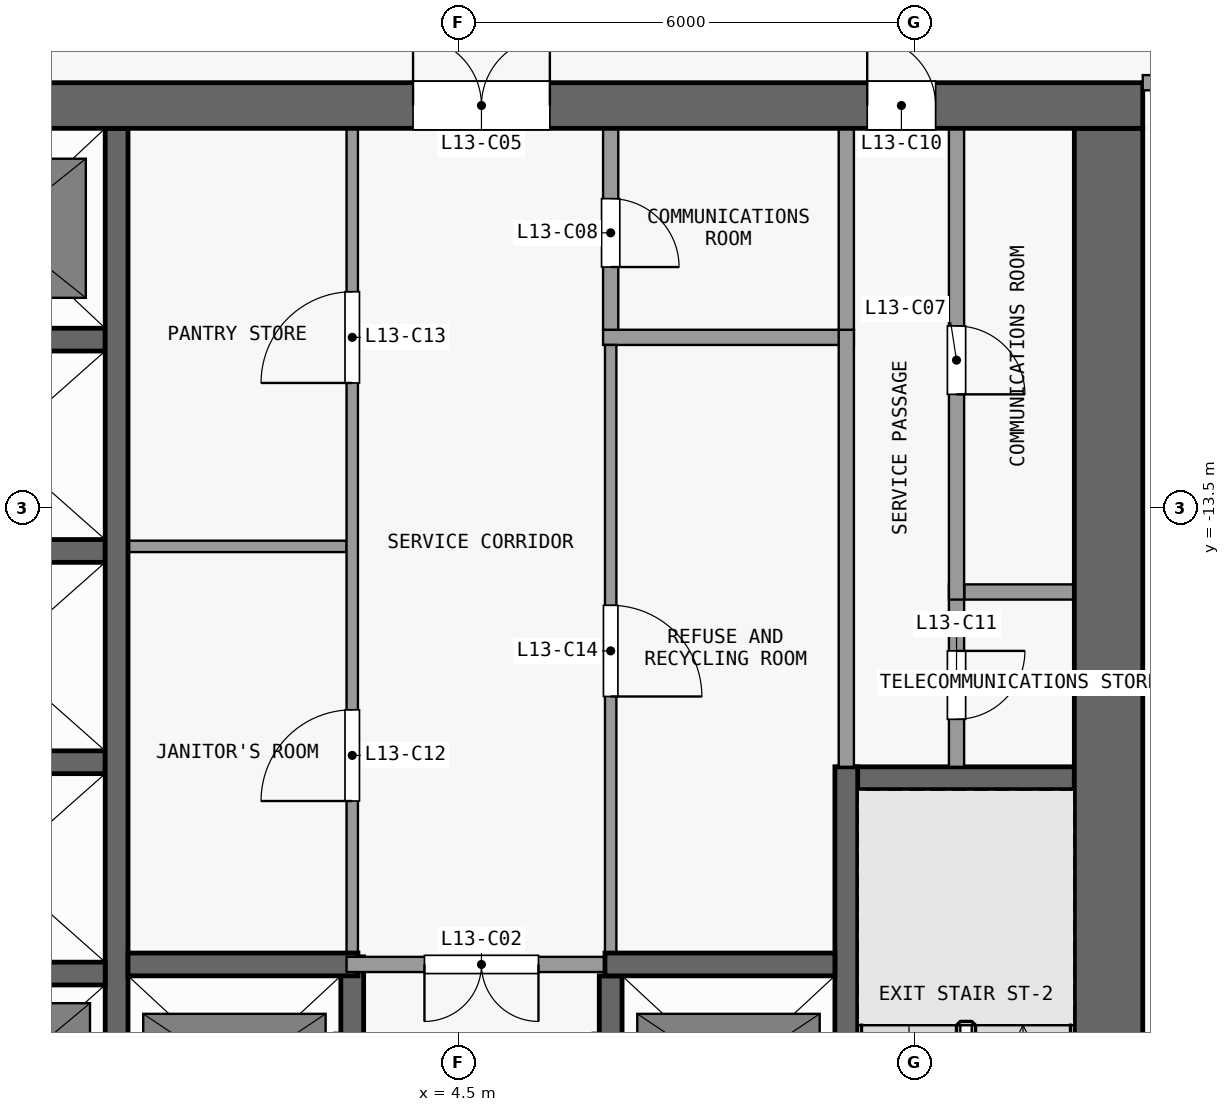
"""IFC4 building model, lengths in metres.
Left out: names, types, materials, properties, quantities, classifications, styles, units other than length and angle.
Written with IfcOpenShell. Run it as: python <this file> out.ifc"""

import sys

from ifc_helpers import new_model, si_unit, direction, frame, frame_2d, origin, place, context, subcontext, project, spatial, rectangle, extrude, element, fill, save


model = new_model("IFC4")
c1 = context("Model", 3, precision=1e-05, world=origin(), true_north=direction((0.0, 1.0)))
c2 = subcontext(c1, "Body", "Model", "MODEL_VIEW")
j1 = project(units=[si_unit("LENGTHUNIT", "METRE"), si_unit("PLANEANGLEUNIT", "RADIAN")], contexts=[c1])
p1 = place(None, origin())
s1 = spatial("IfcSite", under=j1, at=p1, CompositionType="ELEMENT")
p2 = place(p1, origin())
s2 = spatial("IfcBuilding", under=s1, at=p2, CompositionType="ELEMENT")
p3 = place(p2, frame((0.0, 0.0, 57.7)))
s3 = spatial("IfcBuildingStorey", under=s2, at=p3, CompositionType="ELEMENT", Elevation=57.7)
p4 = place(p3, frame((-13.5, -8.2, 0.0), z_axis=(0.0, 0.0, 1.0), x_axis=(1.0, 0.0, 0.0)))
e1 = element("IfcWall", 1, at=p4, inside=s3, PredefinedType="SHEAR", context=c2, shape_type="SweptSolid", body=[
    extrude(rectangle(XDim=27.0, YDim=0.6, at=frame_2d((13.5, 0.0))), origin(), (0.0, 0.0, 1.0), 3.3),
])
p5 = place(p4, frame((7.8, 0.0, 0.0)))
e2 = element("IfcOpeningElement", 2, at=p5, cuts=e1, PredefinedType="OPENING", context=c2, shape_type="SweptSolid", body=[
    extrude(rectangle(XDim=1.8, YDim=2.1, at=frame_2d((0.9, 1.05))), frame((0.0, 0.31, 0.0), z_axis=(0.0, -1.0, 0.0), x_axis=(1.0, 0.0, 0.0)), (0.0, 0.0, 1.0), 0.62),
])
p6 = place(p4, frame((17.4, 0.0, 0.0)))
e3 = element("IfcOpeningElement", 3, at=p6, cuts=e1, PredefinedType="OPENING", context=c2, shape_type="SweptSolid", body=[
    extrude(rectangle(XDim=1.8, YDim=2.1, at=frame_2d((0.9, 1.05))), frame((0.0, 0.31, 0.0), z_axis=(0.0, -1.0, 0.0), x_axis=(1.0, 0.0, 0.0)), (0.0, 0.0, 1.0), 0.62),
])
p7 = place(p4, frame((1.725, 0.0, 0.0)))
e4 = element("IfcOpeningElement", 4, at=p7, cuts=e1, PredefinedType="OPENING", context=c2, shape_type="SweptSolid", body=[
    extrude(rectangle(XDim=1.2, YDim=2.1, at=frame_2d((0.6, 1.05))), frame((0.0, 0.31, 0.0), z_axis=(0.0, -1.0, 0.0), x_axis=(1.0, 0.0, 0.0)), (0.0, 0.0, 1.0), 0.62),
])
p8 = place(p4, frame((23.375, 0.0, 0.0)))
e5 = element("IfcOpeningElement", 5, at=p8, cuts=e1, PredefinedType="OPENING", context=c2, shape_type="SweptSolid", body=[
    extrude(rectangle(XDim=0.9, YDim=2.1, at=frame_2d((0.45, 1.05))), frame((0.0, 0.31, 0.0), z_axis=(0.0, -1.0, 0.0), x_axis=(1.0, 0.0, 0.0)), (0.0, 0.0, 1.0), 0.62),
])
p9 = place(p3, frame((13.05, -24.6, 0.0), z_axis=(0.0, 0.0, 1.0), x_axis=(0.0, 1.0, 0.0)))
e6 = element("IfcWall", 6, at=p9, inside=s3, PredefinedType="SHEAR", context=c2, shape_type="SweptSolid", body=[
    extrude(rectangle(XDim=16.1, YDim=0.9, at=frame_2d((8.05, 0.0))), origin(), (0.0, 0.0, 1.0), 3.3),
])
p10 = place(p3, frame((-2.95, -19.62, 0.0), z_axis=(0.0, 0.0, 1.0), x_axis=(1.0, 0.0, 0.0)))
e7 = element("IfcWall", 7, at=p10, inside=s3, PredefinedType="SHEAR", context=c2, shape_type="SweptSolid", body=[
    extrude(rectangle(XDim=2.8, YDim=0.3, at=frame_2d((1.4, 0.0))), origin(), (0.0, 0.0, 1.0), 3.3),
])
p11 = place(p3, frame((0.15, -19.5, 0.0), z_axis=(0.0, 0.0, 1.0), x_axis=(1.0, 0.0, 0.0)))
e8 = element("IfcWall", 8, at=p11, inside=s3, PredefinedType="SHEAR", context=c2, shape_type="SweptSolid", body=[
    extrude(rectangle(XDim=3.025, YDim=0.3, at=frame_2d((1.513, 0.0))), origin(), (0.0, 0.0, 1.0), 3.3),
])
p12 = place(p3, frame((6.575, -19.5, 0.0), z_axis=(0.0, 0.0, 1.0), x_axis=(-1.0, 0.0, 0.0)))
e9 = element("IfcWall", 9, at=p12, inside=s3, PredefinedType="PARTITIONING", context=c2, shape_type="SweptSolid", body=[
    extrude(rectangle(XDim=3.55, YDim=0.2, at=frame_2d((1.775, 0.0))), origin(), (0.0, 0.0, 1.0), 3.3),
])
p13 = place(p12, frame((1.025, 0.0, 0.0)))
e10 = element("IfcOpeningElement", 10, at=p13, cuts=e9, PredefinedType="OPENING", context=c2, shape_type="SweptSolid", body=[
    extrude(rectangle(XDim=1.5, YDim=2.1, at=frame_2d((0.75, 1.05))), frame((0.0, 0.11, 0.0), z_axis=(0.0, -1.0, 0.0), x_axis=(1.0, 0.0, 0.0)), (0.0, 0.0, 1.0), 0.22),
])
p14 = place(p3, frame((6.425, -19.5, 0.0), z_axis=(0.0, 0.0, 1.0), x_axis=(1.0, 0.0, 0.0)))
e11 = element("IfcWall", 11, at=p14, inside=s3, PredefinedType="SHEAR", context=c2, shape_type="SweptSolid", body=[
    extrude(rectangle(XDim=3.025, YDim=0.3, at=frame_2d((1.512, 0.0))), origin(), (0.0, 0.0, 1.0), 3.3),
])
p15 = place(p3, frame((9.5, -17.05, 0.0), z_axis=(0.0, 0.0, 1.0), x_axis=(1.0, 0.0, 0.0)))
e12 = element("IfcWall", 12, at=p15, inside=s3, PredefinedType="SHEAR", context=c2, shape_type="SweptSolid", body=[
    extrude(rectangle(XDim=3.1, YDim=0.3, at=frame_2d((1.55, 0.0))), origin(), (0.0, 0.0, 1.0), 3.3),
])
p16 = place(p3, frame((-2.95, -16.84, 0.0), z_axis=(0.0, 0.0, 1.0), x_axis=(1.0, 0.0, 0.0)))
e13 = element("IfcWall", 13, at=p16, inside=s3, PredefinedType="SHEAR", context=c2, shape_type="SweptSolid", body=[
    extrude(rectangle(XDim=2.8, YDim=0.3, at=frame_2d((1.4, 0.0))), origin(), (0.0, 0.0, 1.0), 3.3),
])
p17 = place(p3, frame((11.15, -14.6, 0.0), z_axis=(0.0, 0.0, 1.0), x_axis=(1.0, 0.0, 0.0)))
e14 = element("IfcWall", 14, at=p17, inside=s3, PredefinedType="PARTITIONING", context=c2, shape_type="SweptSolid", body=[
    extrude(rectangle(XDim=1.45, YDim=0.2, at=frame_2d((0.725, 0.0))), origin(), (0.0, 0.0, 1.0), 3.3),
])
p18 = place(p3, frame((-2.95, -14.06, 0.0), z_axis=(0.0, 0.0, 1.0), x_axis=(1.0, 0.0, 0.0)))
e15 = element("IfcWall", 15, at=p18, inside=s3, PredefinedType="SHEAR", context=c2, shape_type="SweptSolid", body=[
    extrude(rectangle(XDim=2.8, YDim=0.3, at=frame_2d((1.4, 0.0))), origin(), (0.0, 0.0, 1.0), 3.3),
])
p19 = place(p3, frame((0.15, -14.0, 0.0), z_axis=(0.0, 0.0, 1.0), x_axis=(1.0, 0.0, 0.0)))
e16 = element("IfcWall", 16, at=p19, inside=s3, PredefinedType="PARTITIONING", context=c2, shape_type="SweptSolid", body=[
    extrude(rectangle(XDim=2.875, YDim=0.15, at=frame_2d((1.438, 0.0))), origin(), (0.0, 0.0, 1.0), 3.3),
])
p20 = place(p3, frame((-2.95, -11.28, 0.0), z_axis=(0.0, 0.0, 1.0), x_axis=(1.0, 0.0, 0.0)))
e17 = element("IfcWall", 17, at=p20, inside=s3, PredefinedType="SHEAR", context=c2, shape_type="SweptSolid", body=[
    extrude(rectangle(XDim=2.8, YDim=0.3, at=frame_2d((1.4, 0.0))), origin(), (0.0, 0.0, 1.0), 3.3),
])
p21 = place(p3, frame((6.4, -11.25, 0.0), z_axis=(0.0, 0.0, 1.0), x_axis=(1.0, 0.0, 0.0)))
e18 = element("IfcWall", 18, at=p21, inside=s3, PredefinedType="PARTITIONING", context=c2, shape_type="SweptSolid", body=[
    extrude(rectangle(XDim=3.3, YDim=0.2, at=frame_2d((1.65, 0.0))), origin(), (0.0, 0.0, 1.0), 3.3),
])
p22 = place(p3, frame((0.0, -22.25, 0.0), z_axis=(0.0, 0.0, 1.0), x_axis=(0.0, 1.0, 0.0)))
e19 = element("IfcWall", 19, at=p22, inside=s3, PredefinedType="SHEAR", context=c2, shape_type="SweptSolid", body=[
    extrude(rectangle(XDim=13.75, YDim=0.3, at=frame_2d((6.875, 0.0))), origin(), (0.0, 0.0, 1.0), 3.3),
])
p23 = place(p3, frame((3.1, -22.25, 0.0), z_axis=(0.0, 0.0, 1.0), x_axis=(0.0, 1.0, 0.0)))
e20 = element("IfcWall", 20, at=p23, inside=s3, PredefinedType="SHEAR", context=c2, shape_type="SweptSolid", body=[
    extrude(rectangle(XDim=2.85, YDim=0.3, at=frame_2d((1.425, 0.0))), origin(), (0.0, 0.0, 1.0), 3.3),
])
p24 = place(p23, frame((0.75, 0.0, 0.0)))
e21 = element("IfcOpeningElement", 21, at=p24, cuts=e20, PredefinedType="OPENING", context=c2, shape_type="SweptSolid", body=[
    extrude(rectangle(XDim=1.1, YDim=2.1, at=frame_2d((0.55, 1.05))), frame((0.0, 0.16, 0.0), z_axis=(0.0, -1.0, 0.0), x_axis=(1.0, 0.0, 0.0)), (0.0, 0.0, 1.0), 0.32),
])
p25 = place(p3, frame((3.1, -19.4, 0.0), z_axis=(0.0, 0.0, 1.0), x_axis=(0.0, 1.0, 0.0)))
e22 = element("IfcWall", 22, at=p25, inside=s3, PredefinedType="PARTITIONING", context=c2, shape_type="SweptSolid", body=[
    extrude(rectangle(XDim=10.9, YDim=0.15, at=frame_2d((5.45, 0.0))), origin(), (0.0, 0.0, 1.0), 3.3),
])
p26 = place(p25, frame((2.05, 0.0, 0.0)))
e23 = element("IfcOpeningElement", 23, at=p26, cuts=e22, PredefinedType="OPENING", context=c2, shape_type="SweptSolid", body=[
    extrude(rectangle(XDim=1.2, YDim=2.1, at=frame_2d((0.6, 1.05))), frame((0.0, 0.085, 0.0), z_axis=(0.0, -1.0, 0.0), x_axis=(1.0, 0.0, 0.0)), (0.0, 0.0, 1.0), 0.17),
])
p27 = place(p25, frame((7.55, 0.0, 0.0)))
e24 = element("IfcOpeningElement", 24, at=p27, cuts=e22, PredefinedType="OPENING", context=c2, shape_type="SweptSolid", body=[
    extrude(rectangle(XDim=1.2, YDim=2.1, at=frame_2d((0.6, 1.05))), frame((0.0, 0.085, 0.0), z_axis=(0.0, -1.0, 0.0), x_axis=(1.0, 0.0, 0.0)), (0.0, 0.0, 1.0), 0.17),
])
p28 = place(p3, frame((6.5, -22.25, 0.0), z_axis=(0.0, 0.0, 1.0), x_axis=(0.0, 1.0, 0.0)))
e25 = element("IfcWall", 25, at=p28, inside=s3, PredefinedType="SHEAR", context=c2, shape_type="SweptSolid", body=[
    extrude(rectangle(XDim=2.6, YDim=0.3, at=frame_2d((1.3, 0.0))), origin(), (0.0, 0.0, 1.0), 3.3),
])
p29 = place(p28, frame((0.75, 0.0, 0.0)))
e26 = element("IfcOpeningElement", 26, at=p29, cuts=e25, PredefinedType="OPENING", context=c2, shape_type="SweptSolid", body=[
    extrude(rectangle(XDim=1.1, YDim=2.1, at=frame_2d((0.55, 1.05))), frame((0.0, 0.16, 0.0), z_axis=(0.0, -1.0, 0.0), x_axis=(1.0, 0.0, 0.0)), (0.0, 0.0, 1.0), 0.32),
])
p30 = place(p3, frame((6.5, -11.35, 0.0), z_axis=(0.0, 0.0, 1.0), x_axis=(0.0, -1.0, 0.0)))
e27 = element("IfcWall", 27, at=p30, inside=s3, PredefinedType="PARTITIONING", context=c2, shape_type="SweptSolid", body=[
    extrude(rectangle(XDim=8.0, YDim=0.15, at=frame_2d((4.0, 0.0))), origin(), (0.0, 0.0, 1.0), 3.3),
])
p31 = place(p30, frame((3.425, 0.0, 0.0)))
e28 = element("IfcOpeningElement", 28, at=p31, cuts=e27, PredefinedType="OPENING", context=c2, shape_type="SweptSolid", body=[
    extrude(rectangle(XDim=1.2, YDim=2.1, at=frame_2d((0.6, 1.05))), frame((0.0, 0.085, 0.0), z_axis=(0.0, -1.0, 0.0), x_axis=(1.0, 0.0, 0.0)), (0.0, 0.0, 1.0), 0.17),
])
p32 = place(p3, frame((6.5, -8.5, 0.0), z_axis=(0.0, 0.0, 1.0), x_axis=(0.0, -1.0, 0.0)))
e29 = element("IfcWall", 29, at=p32, inside=s3, PredefinedType="PARTITIONING", context=c2, shape_type="SweptSolid", body=[
    extrude(rectangle(XDim=2.65, YDim=0.2, at=frame_2d((1.325, 0.0))), origin(), (0.0, 0.0, 1.0), 3.3),
])
p33 = place(p32, frame((0.925, 0.0, 0.0)))
e30 = element("IfcOpeningElement", 30, at=p33, cuts=e29, PredefinedType="OPENING", context=c2, shape_type="SweptSolid", body=[
    extrude(rectangle(XDim=0.9, YDim=2.1, at=frame_2d((0.45, 1.05))), frame((0.0, 0.11, 0.0), z_axis=(0.0, -1.0, 0.0), x_axis=(1.0, 0.0, 0.0)), (0.0, 0.0, 1.0), 0.22),
])
p34 = place(p3, frame((9.6, -16.9, 0.0), z_axis=(0.0, 0.0, 1.0), x_axis=(0.0, -1.0, 0.0)))
e31 = element("IfcWall", 31, at=p34, inside=s3, PredefinedType="SHEAR", context=c2, shape_type="SweptSolid", body=[
    extrude(rectangle(XDim=7.7, YDim=0.3, at=frame_2d((3.85, 0.0))), origin(), (0.0, 0.0, 1.0), 3.3),
])
p35 = place(p34, frame((6.5, 0.0, 0.0)))
e32 = element("IfcOpeningElement", 32, at=p35, cuts=e31, PredefinedType="OPENING", context=c2, shape_type="SweptSolid", body=[
    extrude(rectangle(XDim=1.1, YDim=2.1, at=frame_2d((0.55, 1.05))), frame((0.0, 0.16, 0.0), z_axis=(0.0, -1.0, 0.0), x_axis=(1.0, 0.0, 0.0)), (0.0, 0.0, 1.0), 0.32),
])
p36 = place(p3, frame((9.6, -16.9, 0.0), z_axis=(0.0, 0.0, 1.0), x_axis=(0.0, 1.0, 0.0)))
e33 = element("IfcWall", 33, at=p36, inside=s3, PredefinedType="PARTITIONING", context=c2, shape_type="SweptSolid", body=[
    extrude(rectangle(XDim=5.75, YDim=0.2, at=frame_2d((2.875, 0.0))), origin(), (0.0, 0.0, 1.0), 3.3),
])
p37 = place(p3, frame((9.6, -11.15, 0.0), z_axis=(0.0, 0.0, 1.0), x_axis=(0.0, 1.0, 0.0)))
e34 = element("IfcWall", 34, at=p37, inside=s3, PredefinedType="PARTITIONING", context=c2, shape_type="SweptSolid", body=[
    extrude(rectangle(XDim=2.65, YDim=0.2, at=frame_2d((1.325, 0.0))), origin(), (0.0, 0.0, 1.0), 3.3),
])
p38 = place(p3, frame((11.05, -14.5, 0.0), z_axis=(0.0, 0.0, 1.0), x_axis=(0.0, -1.0, 0.0)))
e35 = element("IfcWall", 35, at=p38, inside=s3, PredefinedType="PARTITIONING", context=c2, shape_type="SweptSolid", body=[
    extrude(rectangle(XDim=2.4, YDim=0.2, at=frame_2d((1.2, 0.0))), origin(), (0.0, 0.0, 1.0), 3.3),
])
p39 = place(p38, frame((0.875, 0.0, 0.0)))
e36 = element("IfcOpeningElement", 36, at=p39, cuts=e35, PredefinedType="OPENING", context=c2, shape_type="SweptSolid", body=[
    extrude(rectangle(XDim=0.9, YDim=2.1, at=frame_2d((0.45, 1.05))), frame((0.0, 0.11, 0.0), z_axis=(0.0, -1.0, 0.0), x_axis=(1.0, 0.0, 0.0)), (0.0, 0.0, 1.0), 0.22),
])
p40 = place(p3, frame((11.05, -8.5, 0.0), z_axis=(0.0, 0.0, 1.0), x_axis=(0.0, -1.0, 0.0)))
e37 = element("IfcWall", 37, at=p40, inside=s3, PredefinedType="PARTITIONING", context=c2, shape_type="SweptSolid", body=[
    extrude(rectangle(XDim=6.2, YDim=0.2, at=frame_2d((3.1, 0.0))), origin(), (0.0, 0.0, 1.0), 3.3),
])
p41 = place(p40, frame((2.6, 0.0, 0.0)))
e38 = element("IfcOpeningElement", 38, at=p41, cuts=e37, PredefinedType="OPENING", context=c2, shape_type="SweptSolid", body=[
    extrude(rectangle(XDim=0.9, YDim=2.1, at=frame_2d((0.45, 1.05))), frame((0.0, 0.11, 0.0), z_axis=(0.0, -1.0, 0.0), x_axis=(1.0, 0.0, 0.0)), (0.0, 0.0, 1.0), 0.22),
])
p42 = place(p3, frame((13.5, -7.9, 0.0), z_axis=(0.0, 0.0, 1.0), x_axis=(1.0, 0.0, 0.0)))
e39 = element("IfcWall", 39, at=p42, inside=s3, PredefinedType="PARTITIONING", context=c2, shape_type="SweptSolid", body=[
    extrude(rectangle(XDim=11.75, YDim=0.2, at=frame_2d((5.875, 0.0))), origin(), (0.0, 0.0, 1.0), 3.3),
])
p43 = place(p42, frame((1.0, 0.0, 0.0)))
e40 = element("IfcOpeningElement", 40, at=p43, cuts=e39, PredefinedType="OPENING", context=c2, shape_type="SweptSolid", body=[
    extrude(rectangle(XDim=1.0, YDim=2.1, at=frame_2d((0.5, 1.05))), frame((0.0, 0.11, 0.0), z_axis=(0.0, -1.0, 0.0), x_axis=(1.0, 0.0, 0.0)), (0.0, 0.0, 1.0), 0.22),
])
p44 = place(p13, origin())
e41 = element("IfcDoor", 41, at=p44, inside=s3, OperationType="DOUBLE_DOOR_SINGLE_SWING", PredefinedType="DOOR", context=c2, shape_type="SweptSolid", body=[
    extrude(rectangle(XDim=1.5, YDim=2.1, at=frame_2d((0.75, 1.05))), frame((0.0, 0.025, 0.0), z_axis=(0.0, -1.0, 0.0), x_axis=(1.0, 0.0, 0.0)), (0.0, 0.0, 1.0), 0.05),
])
fill(e10, e41)
p45 = place(p6, origin())
e42 = element("IfcDoor", 42, at=p45, inside=s3, OperationType="DOUBLE_DOOR_SINGLE_SWING", PredefinedType="DOOR", context=c2, shape_type="SweptSolid", body=[
    extrude(rectangle(XDim=1.8, YDim=2.1, at=frame_2d((0.9, 1.05))), frame((0.0, 0.025, 0.0), z_axis=(0.0, -1.0, 0.0), x_axis=(1.0, 0.0, 0.0)), (0.0, 0.0, 1.0), 0.05),
])
fill(e3, e42)
p46 = place(p41, origin())
e43 = element("IfcDoor", 43, at=p46, inside=s3, OperationType="SINGLE_SWING_RIGHT", PredefinedType="DOOR", context=c2, shape_type="SweptSolid", body=[
    extrude(rectangle(XDim=0.9, YDim=2.1, at=frame_2d((0.45, 1.05))), frame((0.0, 0.025, 0.0), z_axis=(0.0, -1.0, 0.0), x_axis=(1.0, 0.0, 0.0)), (0.0, 0.0, 1.0), 0.05),
])
fill(e38, e43)
p47 = place(p33, origin())
e44 = element("IfcDoor", 44, at=p47, inside=s3, OperationType="SINGLE_SWING_RIGHT", PredefinedType="DOOR", context=c2, shape_type="SweptSolid", body=[
    extrude(rectangle(XDim=0.9, YDim=2.1, at=frame_2d((0.45, 1.05))), frame((0.0, 0.025, 0.0), z_axis=(0.0, -1.0, 0.0), x_axis=(1.0, 0.0, 0.0)), (0.0, 0.0, 1.0), 0.05),
])
fill(e30, e44)
p48 = place(p8, origin())
e45 = element("IfcDoor", 45, at=p48, inside=s3, OperationType="SINGLE_SWING_LEFT", PredefinedType="DOOR", context=c2, shape_type="SweptSolid", body=[
    extrude(rectangle(XDim=0.9, YDim=2.1, at=frame_2d((0.45, 1.05))), frame((0.0, 0.025, 0.0), z_axis=(0.0, -1.0, 0.0), x_axis=(1.0, 0.0, 0.0)), (0.0, 0.0, 1.0), 0.05),
])
fill(e5, e45)
p49 = place(p39, origin())
e46 = element("IfcDoor", 46, at=p49, inside=s3, OperationType="SINGLE_SWING_LEFT", PredefinedType="DOOR", context=c2, shape_type="SweptSolid", body=[
    extrude(rectangle(XDim=0.9, YDim=2.1, at=frame_2d((0.45, 1.05))), frame((0.0, 0.025, 0.0), z_axis=(0.0, -1.0, 0.0), x_axis=(1.0, 0.0, 0.0)), (0.0, 0.0, 1.0), 0.05),
])
fill(e36, e46)
p50 = place(p26, origin())
e47 = element("IfcDoor", 47, at=p50, inside=s3, OperationType="SINGLE_SWING_LEFT", PredefinedType="DOOR", context=c2, shape_type="SweptSolid", body=[
    extrude(rectangle(XDim=1.2, YDim=2.1, at=frame_2d((0.6, 1.05))), frame((0.0, 0.025, 0.0), z_axis=(0.0, -1.0, 0.0), x_axis=(1.0, 0.0, 0.0)), (0.0, 0.0, 1.0), 0.05),
])
fill(e23, e47)
p51 = place(p27, origin())
e48 = element("IfcDoor", 48, at=p51, inside=s3, OperationType="SINGLE_SWING_LEFT", PredefinedType="DOOR", context=c2, shape_type="SweptSolid", body=[
    extrude(rectangle(XDim=1.2, YDim=2.1, at=frame_2d((0.6, 1.05))), frame((0.0, 0.025, 0.0), z_axis=(0.0, -1.0, 0.0), x_axis=(1.0, 0.0, 0.0)), (0.0, 0.0, 1.0), 0.05),
])
fill(e24, e48)
p52 = place(p31, origin())
e49 = element("IfcDoor", 49, at=p52, inside=s3, OperationType="SINGLE_SWING_RIGHT", PredefinedType="DOOR", context=c2, shape_type="SweptSolid", body=[
    extrude(rectangle(XDim=1.2, YDim=2.1, at=frame_2d((0.6, 1.05))), frame((0.0, 0.025, 0.0), z_axis=(0.0, -1.0, 0.0), x_axis=(1.0, 0.0, 0.0)), (0.0, 0.0, 1.0), 0.05),
])
fill(e28, e49)
save(model, sys.argv[1])
